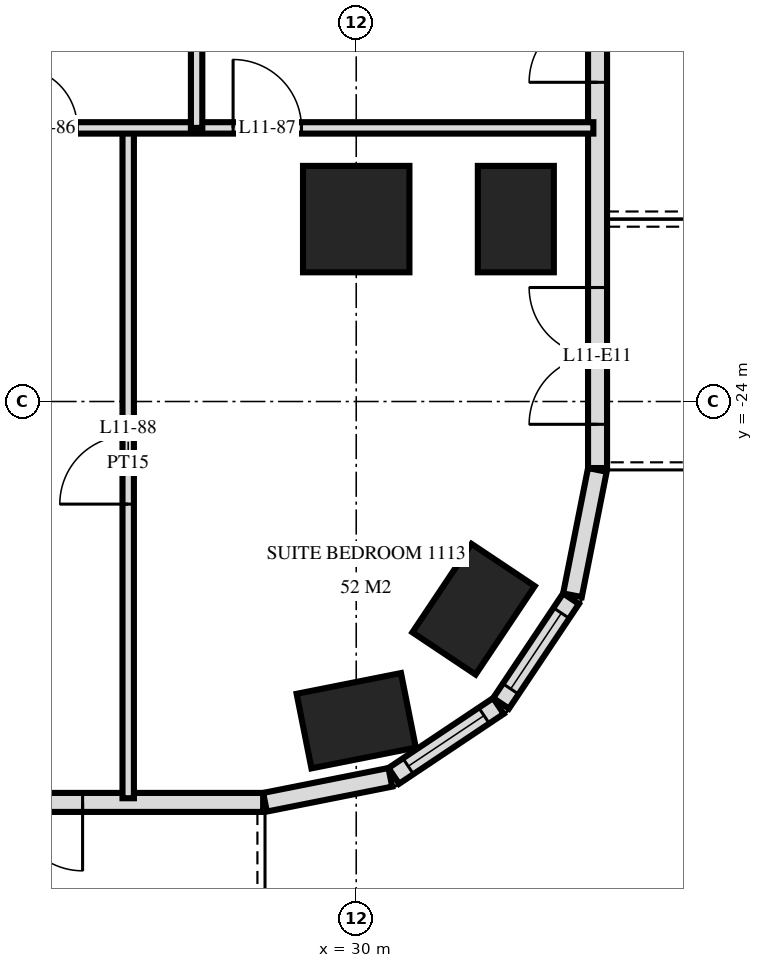
"""IFC4 building model, lengths in metres.
Left out: names, types, materials, properties, quantities, classifications, styles, units other than length and angle.
Written with IfcOpenShell. Run it as: python <this file> out.ifc"""

import sys

from ifc_helpers import new_model, si_unit, direction, frame, frame_2d, origin, origin_2d, place, context, subcontext, project, spatial, rectangle, extrude, element, fill, save


model = new_model("IFC4")
c1 = context("Model", 3, precision=1e-05, world=origin(), true_north=direction((0.0, 1.0)))
c2 = subcontext(c1, "Body", "Model", "MODEL_VIEW")
j1 = project(units=[si_unit("LENGTHUNIT", "METRE"), si_unit("PLANEANGLEUNIT", "RADIAN")], contexts=[c1])
p1 = place(None, origin())
s1 = spatial("IfcSite", under=j1, at=p1, CompositionType="ELEMENT")
p2 = place(p1, origin())
s2 = spatial("IfcBuilding", under=s1, at=p2, CompositionType="ELEMENT")
p3 = place(p2, frame((0.0, 0.0, 49.2)))
s3 = spatial("IfcBuildingStorey", under=s2, at=p3, CompositionType="ELEMENT", Elevation=49.2)
p4 = place(p3, frame((30.0, -28.2, 0.0), z_axis=(0.0, 0.0, 1.0), x_axis=(0.980792089743, 0.195056086032, 0.0)))
e1 = element("IfcColumn", 1, at=p4, inside=s3, PredefinedType="COLUMN", context=c2, shape_type="SweptSolid", body=[
    extrude(rectangle(XDim=1.4, YDim=1.0, at=origin_2d()), origin(), (0.0, 0.0, 1.0), 3.6),
])
p5 = place(p3, frame((30.0, -21.6, 0.0), z_axis=(0.0, 0.0, 1.0), x_axis=(1.0, 0.0, 0.0)))
e2 = element("IfcColumn", 2, at=p5, inside=s3, PredefinedType="COLUMN", context=c2, shape_type="SweptSolid", body=[
    extrude(rectangle(XDim=1.4, YDim=1.4, at=origin_2d()), origin(), (0.0, 0.0, 1.0), 3.6),
])
for number, where, z_axis, x_axis in (
    (3, (31.544, -26.733, 0.0), (0.0, 0.0, 1.0), (0.556, 0.831, 0.0)),
    (4, (32.1, -21.6, 0.0), (0.0, 0.0, 1.0), (0.0, 1.0, 0.0)),
):
    element("IfcColumn", number, at=place(p3, frame(where, z_axis=z_axis, x_axis=x_axis)), inside=s3, PredefinedType="COLUMN", context=c2, shape_type="SweptSolid", body=[
        extrude(rectangle(XDim=1.4, YDim=1.0, at=origin_2d()), origin(), (0.0, 0.0, 1.0), 3.6),
    ])
p6 = place(p3, frame((-28.775, -29.275, 0.0), z_axis=(0.0, 0.0, 1.0), x_axis=(1.0, 0.0, 0.0)))
e5 = element("IfcWall", 5, at=p6, inside=s3, PredefinedType="SOLIDWALL", context=c2, shape_type="SweptSolid", body=[
    extrude(rectangle(XDim=57.551, YDim=0.25, at=frame_2d((28.775, 0.0))), origin(), (0.0, 0.0, 1.0), 3.32),
])
p7 = place(p6, frame((0.575, 0.0, 0.0)))
e6 = element("IfcOpeningElement", 6, at=p7, cuts=e5, PredefinedType="OPENING", context=c2, shape_type="SweptSolid", body=[
    extrude(rectangle(XDim=1.8, YDim=2.4, at=frame_2d((0.9, 1.2))), frame((0.0, 0.135, 0.0), z_axis=(0.0, -1.0, 0.0), x_axis=(1.0, 0.0, 0.0)), (0.0, 0.0, 1.0), 0.27),
])
p8 = place(p6, frame((5.375, 0.0, 0.0)))
e7 = element("IfcOpeningElement", 7, at=p8, cuts=e5, PredefinedType="OPENING", context=c2, shape_type="SweptSolid", body=[
    extrude(rectangle(XDim=1.8, YDim=2.4, at=frame_2d((0.9, 1.2))), frame((0.0, 0.135, 0.0), z_axis=(0.0, -1.0, 0.0), x_axis=(1.0, 0.0, 0.0)), (0.0, 0.0, 1.0), 0.27),
])
p9 = place(p6, frame((8.075, 0.0, 0.3)))
e8 = element("IfcOpeningElement", 8, at=p9, cuts=e5, PredefinedType="OPENING", context=c2, shape_type="SweptSolid", body=[
    extrude(rectangle(XDim=2.4, YDim=2.1, at=frame_2d((1.2, 1.05))), frame((0.0, 0.135, 0.0), z_axis=(0.0, -1.0, 0.0), x_axis=(1.0, 0.0, 0.0)), (0.0, 0.0, 1.0), 0.27),
])
p10 = place(p6, frame((11.375, 0.0, 0.0)))
e9 = element("IfcOpeningElement", 9, at=p10, cuts=e5, PredefinedType="OPENING", context=c2, shape_type="SweptSolid", body=[
    extrude(rectangle(XDim=1.8, YDim=2.4, at=frame_2d((0.9, 1.2))), frame((0.0, 0.135, 0.0), z_axis=(0.0, -1.0, 0.0), x_axis=(1.0, 0.0, 0.0)), (0.0, 0.0, 1.0), 0.27),
])
p11 = place(p6, frame((14.075, 0.0, 0.3)))
e10 = element("IfcOpeningElement", 10, at=p11, cuts=e5, PredefinedType="OPENING", context=c2, shape_type="SweptSolid", body=[
    extrude(rectangle(XDim=2.4, YDim=2.1, at=frame_2d((1.2, 1.05))), frame((0.0, 0.135, 0.0), z_axis=(0.0, -1.0, 0.0), x_axis=(1.0, 0.0, 0.0)), (0.0, 0.0, 1.0), 0.27),
])
p12 = place(p6, frame((17.375, 0.0, 0.0)))
e11 = element("IfcOpeningElement", 11, at=p12, cuts=e5, PredefinedType="OPENING", context=c2, shape_type="SweptSolid", body=[
    extrude(rectangle(XDim=1.8, YDim=2.4, at=frame_2d((0.9, 1.2))), frame((0.0, 0.135, 0.0), z_axis=(0.0, -1.0, 0.0), x_axis=(1.0, 0.0, 0.0)), (0.0, 0.0, 1.0), 0.27),
])
p13 = place(p6, frame((20.075, 0.0, 0.3)))
e12 = element("IfcOpeningElement", 12, at=p13, cuts=e5, PredefinedType="OPENING", context=c2, shape_type="SweptSolid", body=[
    extrude(rectangle(XDim=2.4, YDim=2.1, at=frame_2d((1.2, 1.05))), frame((0.0, 0.135, 0.0), z_axis=(0.0, -1.0, 0.0), x_axis=(1.0, 0.0, 0.0)), (0.0, 0.0, 1.0), 0.27),
])
p14 = place(p6, frame((23.075, 0.0, 0.3)))
e13 = element("IfcOpeningElement", 13, at=p14, cuts=e5, PredefinedType="OPENING", context=c2, shape_type="SweptSolid", body=[
    extrude(rectangle(XDim=2.4, YDim=2.1, at=frame_2d((1.2, 1.05))), frame((0.0, 0.135, 0.0), z_axis=(0.0, -1.0, 0.0), x_axis=(1.0, 0.0, 0.0)), (0.0, 0.0, 1.0), 0.27),
])
p15 = place(p6, frame((26.375, 0.0, 0.0)))
e14 = element("IfcOpeningElement", 14, at=p15, cuts=e5, PredefinedType="OPENING", context=c2, shape_type="SweptSolid", body=[
    extrude(rectangle(XDim=1.8, YDim=2.4, at=frame_2d((0.9, 1.2))), frame((0.0, 0.135, 0.0), z_axis=(0.0, -1.0, 0.0), x_axis=(1.0, 0.0, 0.0)), (0.0, 0.0, 1.0), 0.27),
])
p16 = place(p6, frame((29.375, 0.0, 0.0)))
e15 = element("IfcOpeningElement", 15, at=p16, cuts=e5, PredefinedType="OPENING", context=c2, shape_type="SweptSolid", body=[
    extrude(rectangle(XDim=1.8, YDim=2.4, at=frame_2d((0.9, 1.2))), frame((0.0, 0.135, 0.0), z_axis=(0.0, -1.0, 0.0), x_axis=(1.0, 0.0, 0.0)), (0.0, 0.0, 1.0), 0.27),
])
p17 = place(p6, frame((32.075, 0.0, 0.3)))
e16 = element("IfcOpeningElement", 16, at=p17, cuts=e5, PredefinedType="OPENING", context=c2, shape_type="SweptSolid", body=[
    extrude(rectangle(XDim=2.4, YDim=2.1, at=frame_2d((1.2, 1.05))), frame((0.0, 0.135, 0.0), z_axis=(0.0, -1.0, 0.0), x_axis=(1.0, 0.0, 0.0)), (0.0, 0.0, 1.0), 0.27),
])
p18 = place(p6, frame((35.075, 0.0, 0.3)))
e17 = element("IfcOpeningElement", 17, at=p18, cuts=e5, PredefinedType="OPENING", context=c2, shape_type="SweptSolid", body=[
    extrude(rectangle(XDim=2.4, YDim=2.1, at=frame_2d((1.2, 1.05))), frame((0.0, 0.135, 0.0), z_axis=(0.0, -1.0, 0.0), x_axis=(1.0, 0.0, 0.0)), (0.0, 0.0, 1.0), 0.27),
])
p19 = place(p6, frame((38.375, 0.0, 0.0)))
e18 = element("IfcOpeningElement", 18, at=p19, cuts=e5, PredefinedType="OPENING", context=c2, shape_type="SweptSolid", body=[
    extrude(rectangle(XDim=1.8, YDim=2.4, at=frame_2d((0.9, 1.2))), frame((0.0, 0.135, 0.0), z_axis=(0.0, -1.0, 0.0), x_axis=(1.0, 0.0, 0.0)), (0.0, 0.0, 1.0), 0.27),
])
p20 = place(p6, frame((41.375, 0.0, 0.0)))
e19 = element("IfcOpeningElement", 19, at=p20, cuts=e5, PredefinedType="OPENING", context=c2, shape_type="SweptSolid", body=[
    extrude(rectangle(XDim=1.8, YDim=2.4, at=frame_2d((0.9, 1.2))), frame((0.0, 0.135, 0.0), z_axis=(0.0, -1.0, 0.0), x_axis=(1.0, 0.0, 0.0)), (0.0, 0.0, 1.0), 0.27),
])
p21 = place(p6, frame((44.075, 0.0, 0.3)))
e20 = element("IfcOpeningElement", 20, at=p21, cuts=e5, PredefinedType="OPENING", context=c2, shape_type="SweptSolid", body=[
    extrude(rectangle(XDim=2.4, YDim=2.1, at=frame_2d((1.2, 1.05))), frame((0.0, 0.135, 0.0), z_axis=(0.0, -1.0, 0.0), x_axis=(1.0, 0.0, 0.0)), (0.0, 0.0, 1.0), 0.27),
])
p22 = place(p6, frame((47.075, 0.0, 0.3)))
e21 = element("IfcOpeningElement", 21, at=p22, cuts=e5, PredefinedType="OPENING", context=c2, shape_type="SweptSolid", body=[
    extrude(rectangle(XDim=2.4, YDim=2.1, at=frame_2d((1.2, 1.05))), frame((0.0, 0.135, 0.0), z_axis=(0.0, -1.0, 0.0), x_axis=(1.0, 0.0, 0.0)), (0.0, 0.0, 1.0), 0.27),
])
p23 = place(p6, frame((50.375, 0.0, 0.0)))
e22 = element("IfcOpeningElement", 22, at=p23, cuts=e5, PredefinedType="OPENING", context=c2, shape_type="SweptSolid", body=[
    extrude(rectangle(XDim=1.8, YDim=2.4, at=frame_2d((0.9, 1.2))), frame((0.0, 0.135, 0.0), z_axis=(0.0, -1.0, 0.0), x_axis=(1.0, 0.0, 0.0)), (0.0, 0.0, 1.0), 0.27),
])
p24 = place(p6, frame((53.375, 0.0, 0.0)))
e23 = element("IfcOpeningElement", 23, at=p24, cuts=e5, PredefinedType="OPENING", context=c2, shape_type="SweptSolid", body=[
    extrude(rectangle(XDim=1.8, YDim=2.4, at=frame_2d((0.9, 1.2))), frame((0.0, 0.135, 0.0), z_axis=(0.0, -1.0, 0.0), x_axis=(1.0, 0.0, 0.0)), (0.0, 0.0, 1.0), 0.27),
])
p25 = place(p3, frame((28.8, -29.273, 0.0), z_axis=(0.0, 0.0, 1.0), x_axis=(0.980775640221, 0.19513878023, 0.0)))
e24 = element("IfcWall", 24, at=p25, inside=s3, PredefinedType="SOLIDWALL", context=c2, shape_type="SweptSolid", body=[
    extrude(rectangle(XDim=1.681, YDim=0.25, at=frame_2d((0.841, 0.0))), origin(), (0.0, 0.0, 1.0), 3.32),
])
p26 = place(p3, frame((30.494, -28.926, 0.0), z_axis=(0.0, 0.0, 1.0), x_axis=(0.831482937015, 0.55555029066, 0.0)))
e25 = element("IfcWall", 25, at=p26, inside=s3, PredefinedType="SOLIDWALL", context=c2, shape_type="SweptSolid", body=[
    extrude(rectangle(XDim=1.656, YDim=0.25, at=frame_2d((0.828, 0.0))), origin(), (0.0, 0.0, 1.0), 3.32),
])
p27 = place(p26, frame((0.228, 0.0, 0.9)))
e26 = element("IfcOpeningElement", 26, at=p27, cuts=e25, PredefinedType="OPENING", context=c2, shape_type="SweptSolid", body=[
    extrude(rectangle(XDim=1.2, YDim=1.5, at=frame_2d((0.6, 0.75))), frame((0.0, 0.135, 0.0), z_axis=(0.0, -1.0, 0.0), x_axis=(1.0, 0.0, 0.0)), (0.0, 0.0, 1.0), 0.27),
])
p28 = place(p3, frame((31.906, -27.971, 0.0), z_axis=(0.0, 0.0, 1.0), x_axis=(0.55555029066, 0.831482937015, 0.0)))
e27 = element("IfcWall", 27, at=p28, inside=s3, PredefinedType="SOLIDWALL", context=c2, shape_type="SweptSolid", body=[
    extrude(rectangle(XDim=1.656, YDim=0.25, at=frame_2d((0.828, 0.0))), origin(), (0.0, 0.0, 1.0), 3.32),
])
p29 = place(p28, frame((0.228, 0.0, 0.9)))
e28 = element("IfcOpeningElement", 28, at=p29, cuts=e27, PredefinedType="OPENING", context=c2, shape_type="SweptSolid", body=[
    extrude(rectangle(XDim=1.2, YDim=1.5, at=frame_2d((0.6, 0.75))), frame((0.0, 0.135, 0.0), z_axis=(0.0, -1.0, 0.0), x_axis=(1.0, 0.0, 0.0)), (0.0, 0.0, 1.0), 0.27),
])
p30 = place(p3, frame((32.844, -26.549, 0.0), z_axis=(0.0, 0.0, 1.0), x_axis=(0.195166572128, 0.980770110232, 0.0)))
e29 = element("IfcWall", 29, at=p30, inside=s3, PredefinedType="SOLIDWALL", context=c2, shape_type="SweptSolid", body=[
    extrude(rectangle(XDim=1.681, YDim=0.25, at=frame_2d((0.841, 0.0))), origin(), (0.0, 0.0, 1.0), 3.32),
])
p31 = place(p3, frame((33.175, -24.875, 0.0), z_axis=(0.0, 0.0, 1.0), x_axis=(0.0, 1.0, 0.0)))
e30 = element("IfcWall", 30, at=p31, inside=s3, PredefinedType="SOLIDWALL", context=c2, shape_type="SweptSolid", body=[
    extrude(rectangle(XDim=21.551, YDim=0.25, at=frame_2d((10.775, 0.0))), origin(), (0.0, 0.0, 1.0), 3.32),
])
p32 = place(p31, frame((0.575, 0.0, 0.0)))
e31 = element("IfcOpeningElement", 31, at=p32, cuts=e30, PredefinedType="OPENING", context=c2, shape_type="SweptSolid", body=[
    extrude(rectangle(XDim=1.8, YDim=2.4, at=frame_2d((0.9, 1.2))), frame((0.0, 0.135, 0.0), z_axis=(0.0, -1.0, 0.0), x_axis=(1.0, 0.0, 0.0)), (0.0, 0.0, 1.0), 0.27),
])
p33 = place(p31, frame((5.075, 0.0, 0.0)))
e32 = element("IfcOpeningElement", 32, at=p33, cuts=e30, PredefinedType="OPENING", context=c2, shape_type="SweptSolid", body=[
    extrude(rectangle(XDim=1.8, YDim=2.4, at=frame_2d((0.9, 1.2))), frame((0.0, 0.135, 0.0), z_axis=(0.0, -1.0, 0.0), x_axis=(1.0, 0.0, 0.0)), (0.0, 0.0, 1.0), 0.27),
])
p34 = place(p31, frame((8.075, 0.0, 0.3)))
e33 = element("IfcOpeningElement", 33, at=p34, cuts=e30, PredefinedType="OPENING", context=c2, shape_type="SweptSolid", body=[
    extrude(rectangle(XDim=1.2, YDim=2.1, at=frame_2d((0.6, 1.05))), frame((0.0, 0.135, 0.0), z_axis=(0.0, -1.0, 0.0), x_axis=(1.0, 0.0, 0.0)), (0.0, 0.0, 1.0), 0.27),
])
p35 = place(p31, frame((13.1, 0.0, 0.0)))
e34 = element("IfcOpeningElement", 34, at=p35, cuts=e30, PredefinedType="OPENING", context=c2, shape_type="SweptSolid", body=[
    extrude(rectangle(XDim=1.8, YDim=2.4, at=frame_2d((0.9, 1.2))), frame((0.0, 0.135, 0.0), z_axis=(0.0, -1.0, 0.0), x_axis=(1.0, 0.0, 0.0)), (0.0, 0.0, 1.0), 0.27),
])
p36 = place(p3, frame((27.9, -20.4, 0.0), z_axis=(0.0, 0.0, 1.0), x_axis=(0.0, 1.0, 0.0)))
e35 = element("IfcWall", 35, at=p36, inside=s3, PredefinedType="PARTITIONING", context=c2, shape_type="SweptSolid", body=[
    extrude(rectangle(XDim=3.0, YDim=0.15, at=frame_2d((1.5, 0.0))), origin(), (0.0, 0.0, 1.0), 3.32),
])
p37 = place(p3, frame((27.0, -29.22, 0.0), z_axis=(0.0, 0.0, 1.0), x_axis=(0.0, 1.0, 0.0)))
e36 = element("IfcWall", 36, at=p37, inside=s3, PredefinedType="PARTITIONING", context=c2, shape_type="SweptSolid", body=[
    extrude(rectangle(XDim=8.82, YDim=0.15, at=frame_2d((4.41, 0.0))), origin(), (0.0, 0.0, 1.0), 3.32),
])
p38 = place(p37, frame((3.87, 0.0, 0.0)))
e37 = element("IfcOpeningElement", 37, at=p38, cuts=e36, PredefinedType="OPENING", context=c2, shape_type="SweptSolid", body=[
    extrude(rectangle(XDim=0.9, YDim=2.1, at=frame_2d((0.45, 1.05))), frame((0.0, 0.085, 0.0), z_axis=(0.0, -1.0, 0.0), x_axis=(1.0, 0.0, 0.0)), (0.0, 0.0, 1.0), 0.17),
])
p39 = place(p3, frame((24.9, -20.4, 0.0), z_axis=(0.0, 0.0, 1.0), x_axis=(1.0, 0.0, 0.0)))
e38 = element("IfcWall", 38, at=p39, inside=s3, PredefinedType="PARTITIONING", context=c2, shape_type="SweptSolid", body=[
    extrude(rectangle(XDim=8.22, YDim=0.15, at=frame_2d((4.11, 0.0))), origin(), (0.0, 0.0, 1.0), 3.32),
])
p40 = place(p39, frame((0.63, 0.0, 0.0)))
e39 = element("IfcOpeningElement", 39, at=p40, cuts=e38, PredefinedType="OPENING", context=c2, shape_type="SweptSolid", body=[
    extrude(rectangle(XDim=0.8, YDim=2.1, at=frame_2d((0.4, 1.05))), frame((0.0, 0.085, 0.0), z_axis=(0.0, -1.0, 0.0), x_axis=(1.0, 0.0, 0.0)), (0.0, 0.0, 1.0), 0.17),
])
p41 = place(p39, frame((3.48, 0.0, 0.0)))
e40 = element("IfcOpeningElement", 40, at=p41, cuts=e38, PredefinedType="OPENING", context=c2, shape_type="SweptSolid", body=[
    extrude(rectangle(XDim=0.9, YDim=2.1, at=frame_2d((0.45, 1.05))), frame((0.0, 0.085, 0.0), z_axis=(0.0, -1.0, 0.0), x_axis=(1.0, 0.0, 0.0)), (0.0, 0.0, 1.0), 0.17),
])
p42 = place(p27, origin())
e41 = element("IfcWindow", 41, at=p42, inside=s3, PartitioningType="SINGLE_PANEL", PredefinedType="WINDOW", context=c2, shape_type="SweptSolid", body=[
    extrude(rectangle(XDim=1.2, YDim=1.5, at=frame_2d((0.6, 0.75))), frame((0.0, 0.03, 0.0), z_axis=(0.0, -1.0, 0.0), x_axis=(1.0, 0.0, 0.0)), (0.0, 0.0, 1.0), 0.06),
])
fill(e26, e41)
p43 = place(p29, origin())
e42 = element("IfcWindow", 42, at=p43, inside=s3, PartitioningType="SINGLE_PANEL", PredefinedType="WINDOW", context=c2, shape_type="SweptSolid", body=[
    extrude(rectangle(XDim=1.2, YDim=1.5, at=frame_2d((0.6, 0.75))), frame((0.0, 0.03, 0.0), z_axis=(0.0, -1.0, 0.0), x_axis=(1.0, 0.0, 0.0)), (0.0, 0.0, 1.0), 0.06),
])
fill(e28, e42)
p44 = place(p24, frame((0.9, 0.0, 0.0), z_axis=(0.0, 0.0, 1.0), x_axis=(-1.0, 0.0, 0.0)))
e43 = element("IfcDoor", 43, at=p44, inside=s3, OperationType="DOUBLE_DOOR_SINGLE_SWING", PredefinedType="DOOR", context=c2, shape_type="SweptSolid", body=[
    extrude(rectangle(XDim=1.8, YDim=2.4, at=frame_2d((0.0, 1.2))), frame((0.0, -0.025, 0.0), z_axis=(0.0, 1.0, 0.0), x_axis=(-1.0, 0.0, 0.0)), (0.0, 0.0, 1.0), 0.05),
])
fill(e23, e43)
p45 = place(p32, origin())
e44 = element("IfcDoor", 44, at=p45, inside=s3, OperationType="DOUBLE_DOOR_SINGLE_SWING", PredefinedType="DOOR", context=c2, shape_type="SweptSolid", body=[
    extrude(rectangle(XDim=1.8, YDim=2.4, at=frame_2d((0.9, 1.2))), frame((0.0, 0.025, 0.0), z_axis=(0.0, -1.0, 0.0), x_axis=(1.0, 0.0, 0.0)), (0.0, 0.0, 1.0), 0.05),
])
fill(e31, e44)
p46 = place(p33, origin())
e45 = element("IfcDoor", 45, at=p46, inside=s3, OperationType="DOUBLE_DOOR_SINGLE_SWING", PredefinedType="DOOR", context=c2, shape_type="SweptSolid", body=[
    extrude(rectangle(XDim=1.8, YDim=2.4, at=frame_2d((0.9, 1.2))), frame((0.0, 0.025, 0.0), z_axis=(0.0, -1.0, 0.0), x_axis=(1.0, 0.0, 0.0)), (0.0, 0.0, 1.0), 0.05),
])
fill(e32, e45)
p47 = place(p40, origin())
e46 = element("IfcDoor", 46, at=p47, inside=s3, OperationType="SINGLE_SWING_RIGHT", PredefinedType="DOOR", context=c2, shape_type="SweptSolid", body=[
    extrude(rectangle(XDim=0.8, YDim=2.1, at=frame_2d((0.4, 1.05))), frame((0.0, 0.025, 0.0), z_axis=(0.0, -1.0, 0.0), x_axis=(1.0, 0.0, 0.0)), (0.0, 0.0, 1.0), 0.05),
])
fill(e39, e46)
p48 = place(p41, origin())
e47 = element("IfcDoor", 47, at=p48, inside=s3, OperationType="SINGLE_SWING_RIGHT", PredefinedType="DOOR", context=c2, shape_type="SweptSolid", body=[
    extrude(rectangle(XDim=0.9, YDim=2.1, at=frame_2d((0.45, 1.05))), frame((0.0, 0.025, 0.0), z_axis=(0.0, -1.0, 0.0), x_axis=(1.0, 0.0, 0.0)), (0.0, 0.0, 1.0), 0.05),
])
fill(e40, e47)
p49 = place(p38, origin())
e48 = element("IfcDoor", 48, at=p49, inside=s3, OperationType="SINGLE_SWING_RIGHT", PredefinedType="DOOR", context=c2, shape_type="SweptSolid", body=[
    extrude(rectangle(XDim=0.9, YDim=2.1, at=frame_2d((0.45, 1.05))), frame((0.0, 0.025, 0.0), z_axis=(0.0, -1.0, 0.0), x_axis=(1.0, 0.0, 0.0)), (0.0, 0.0, 1.0), 0.05),
])
fill(e37, e48)
save(model, sys.argv[1])
